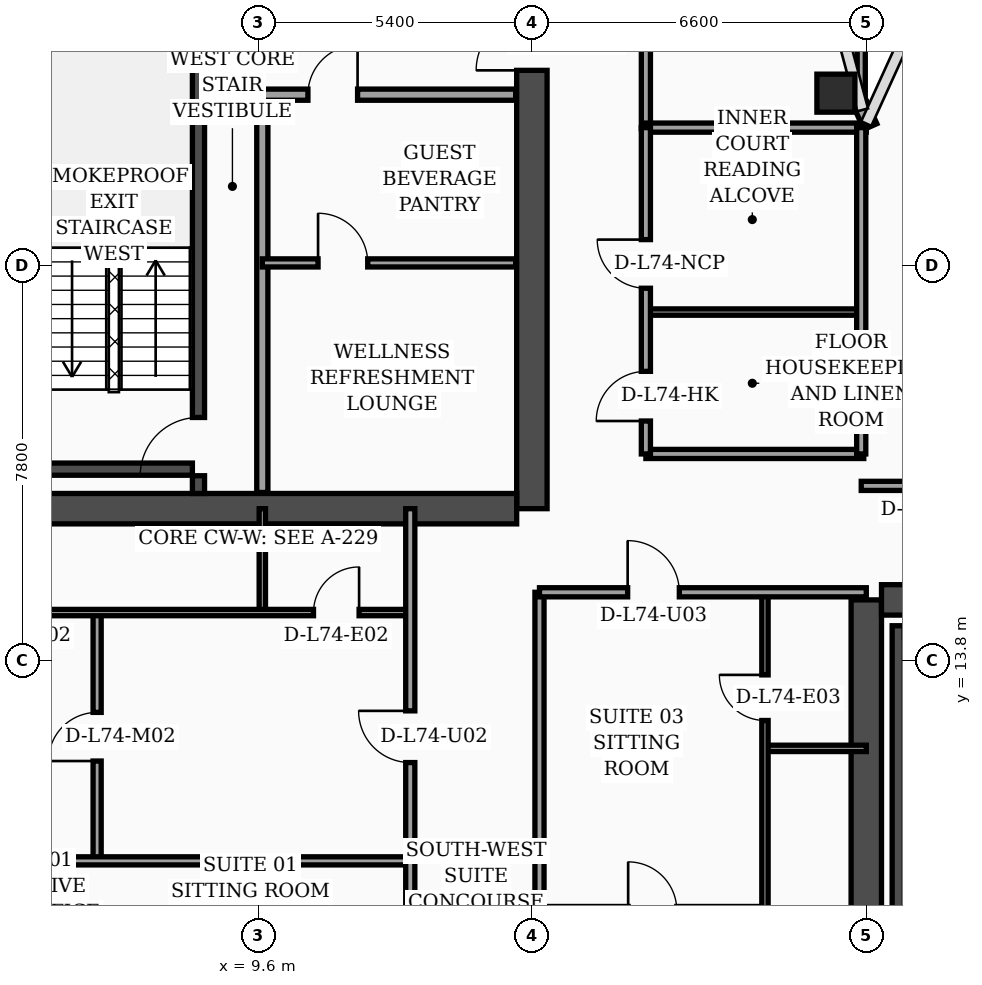
"""IFC4 building model, lengths in metres.
Left out: names, types, materials, properties, quantities, classifications, styles, units other than length and angle.
Written with IfcOpenShell. Run it as: python <this file> out.ifc"""

import sys

from ifc_helpers import new_model, si_unit, direction, frame, frame_2d, origin, origin_2d, place, context, subcontext, project, spatial, rectangle, hollow_rectangle, extrude, element, fill, save


model = new_model("IFC4")
c1 = context("Model", 3, precision=1e-05, world=origin(), true_north=direction((0.0, 1.0)))
c2 = subcontext(c1, "Body", "Model", "MODEL_VIEW")
j1 = project(units=[si_unit("LENGTHUNIT", "METRE"), si_unit("PLANEANGLEUNIT", "RADIAN")], contexts=[c1])
p1 = place(None, origin())
s1 = spatial("IfcSite", under=j1, at=p1, CompositionType="ELEMENT")
p2 = place(p1, origin())
s2 = spatial("IfcBuilding", under=s1, at=p2, CompositionType="ELEMENT")
p3 = place(p2, frame((0.0, 0.0, 298.7)))
s3 = spatial("IfcBuildingStorey", under=s2, at=p3, CompositionType="ELEMENT", Elevation=298.7)
p4 = place(p3, frame((15.0, 16.8, 0.0), z_axis=(0.0, 0.0, 1.0), x_axis=(0.0, 1.0, 0.0)))
e1 = element("IfcWall", 1, at=p4, inside=s3, PredefinedType="SHEAR", context=c2, shape_type="SweptSolid", body=[
    extrude(rectangle(XDim=21.6, YDim=0.6, at=frame_2d((10.8, 0.0))), origin(), (0.0, 0.0, 1.0), 3.56),
])
p5 = place(p4, frame((8.65, 0.0, 0.0)))
e2 = element("IfcOpeningElement", 2, at=p5, cuts=e1, PredefinedType="OPENING", context=c2, shape_type="SweptSolid", body=[
    extrude(rectangle(XDim=1.1, YDim=2.2, at=frame_2d((0.55, 1.1))), frame((0.0, 0.31, 0.0), z_axis=(0.0, -1.0, 0.0), x_axis=(1.0, 0.0, 0.0)), (0.0, 0.0, 1.0), 0.62),
])
p6 = place(p4, frame((18.9, 0.0, 0.0)))
e3 = element("IfcOpeningElement", 3, at=p6, cuts=e1, PredefinedType="OPENING", context=c2, shape_type="SweptSolid", body=[
    extrude(rectangle(XDim=1.1, YDim=2.2, at=frame_2d((0.55, 1.1))), frame((0.0, 0.31, 0.0), z_axis=(0.0, -1.0, 0.0), x_axis=(1.0, 0.0, 0.0)), (0.0, 0.0, 1.0), 0.62),
])
p7 = place(p3, frame((4.5, 16.8, 0.0), z_axis=(0.0, 0.0, 1.0), x_axis=(1.0, 0.0, 0.0)))
e4 = element("IfcWall", 4, at=p7, inside=s3, PredefinedType="SHEAR", context=c2, shape_type="SweptSolid", body=[
    extrude(rectangle(XDim=10.2, YDim=0.6, at=frame_2d((5.1, 0.0))), origin(), (0.0, 0.0, 1.0), 3.56),
])
p8 = place(p3, frame((21.6, 4.6, 0.0), z_axis=(0.0, 0.0, 1.0), x_axis=(0.0, 1.0, 0.0)))
e5 = element("IfcWall", 5, at=p8, inside=s3, PredefinedType="SHEAR", context=c2, shape_type="SweptSolid", body=[
    extrude(rectangle(XDim=10.4, YDim=0.6, at=frame_2d((5.2, 0.0))), origin(), (0.0, 0.0, 1.0), 3.56),
])
p9 = place(p3, frame((21.9, 15.0, 0.0), z_axis=(0.0, 0.0, 1.0), x_axis=(1.0, 0.0, 0.0)))
e6 = element("IfcWall", 6, at=p9, inside=s3, PredefinedType="SHEAR", context=c2, shape_type="SweptSolid", body=[
    extrude(rectangle(XDim=10.2, YDim=0.6, at=frame_2d((5.1, 0.0))), origin(), (0.0, 0.0, 1.0), 3.56),
])
p10 = place(p9, frame((5.0, 0.0, 0.0)))
e7 = element("IfcOpeningElement", 7, at=p10, cuts=e6, PredefinedType="OPENING", context=c2, shape_type="SweptSolid", body=[
    extrude(rectangle(XDim=1.1, YDim=2.2, at=frame_2d((0.55, 1.1))), frame((0.0, 0.31, 0.0), z_axis=(0.0, -1.0, 0.0), x_axis=(1.0, 0.0, 0.0)), (0.0, 0.0, 1.0), 0.62),
])
p11 = place(p3, frame((8.42, 17.1, 0.0), z_axis=(0.0, 0.0, 1.0), x_axis=(0.0, 1.0, 0.0)))
e8 = element("IfcWall", 8, at=p11, inside=s3, PredefinedType="SOLIDWALL", context=c2, shape_type="SweptSolid", body=[
    extrude(rectangle(XDim=9.69, YDim=0.24, at=frame_2d((4.845, 0.0))), origin(), (0.0, 0.0, 1.0), 3.56),
])
p12 = place(p11, frame((0.35, 0.0, 0.0)))
e9 = element("IfcOpeningElement", 9, at=p12, cuts=e8, PredefinedType="OPENING", context=c2, shape_type="SweptSolid", body=[
    extrude(rectangle(XDim=1.15, YDim=2.2, at=frame_2d((0.575, 1.1))), frame((0.0, 0.13, 0.0), z_axis=(0.0, -1.0, 0.0), x_axis=(1.0, 0.0, 0.0)), (0.0, 0.0, 1.0), 0.26),
])
p13 = place(p3, frame((5.2, 17.58, 0.0), z_axis=(0.0, 0.0, 1.0), x_axis=(1.0, 0.0, 0.0)))
e10 = element("IfcWall", 10, at=p13, inside=s3, PredefinedType="SOLIDWALL", context=c2, shape_type="SweptSolid", body=[
    extrude(rectangle(XDim=3.1, YDim=0.24, at=frame_2d((1.55, 0.0))), origin(), (0.0, 0.0, 1.0), 3.56),
])
p14 = place(p3, frame((22.23, 4.9, 0.0), z_axis=(0.0, 0.0, 1.0), x_axis=(0.0, 1.0, 0.0)))
e11 = element("IfcWall", 11, at=p14, inside=s3, PredefinedType="SOLIDWALL", context=c2, shape_type="SweptSolid", body=[
    extrude(rectangle(XDim=9.59, YDim=0.24, at=frame_2d((4.795, 0.0))), origin(), (0.0, 0.0, 1.0), 3.56),
])
p15 = place(p3, frame((21.0, 25.0, 0.0), z_axis=(0.0, 0.0, 1.0), x_axis=(1.0, 0.0, 0.0)))
e12 = element("IfcColumn", 12, at=p15, inside=s3, PredefinedType="COLUMN", context=c2, shape_type="SweptSolid", body=[
    extrude(hollow_rectangle(XDim=0.75, YDim=0.75, WallThickness=0.032, at=origin_2d()), origin(), (0.0, 0.0, 1.0), 3.56),
])
p16 = place(p3, frame((21.68, 24.34, 0.0), z_axis=(0.0, 0.0, 1.0), x_axis=(-0.40758134973, 0.913168901875, 0.0)))
e13 = element("IfcWall", 13, at=p16, inside=s3, PredefinedType="SOLIDWALL", context=c2, shape_type="SweptSolid", body=[
    extrude(rectangle(XDim=0.471, YDim=0.28, at=frame_2d((0.235, 0.0))), origin(), (0.0, 0.0, 1.0), 3.56),
])
p17 = place(p3, frame((9.68, 17.12, 0.0), z_axis=(0.0, 0.0, 1.0), x_axis=(0.0, 1.0, 0.0)))
e14 = element("IfcWall", 14, at=p17, inside=s3, PredefinedType="SOLIDWALL", context=c2, shape_type="SweptSolid", body=[
    extrude(rectangle(XDim=7.88, YDim=0.22, at=frame_2d((3.94, 0.0))), origin(), (0.0, 0.0, 1.0), 3.56),
])
p18 = place(p3, frame((9.68, 21.65, 0.0), z_axis=(0.0, 0.0, 1.0), x_axis=(1.0, 0.0, 0.0)))
e15 = element("IfcWall", 15, at=p18, inside=s3, PredefinedType="PARTITIONING", context=c2, shape_type="SweptSolid", body=[
    extrude(rectangle(XDim=5.0, YDim=0.16, at=frame_2d((2.5, 0.0))), origin(), (0.0, 0.0, 1.0), 3.09),
])
p19 = place(p18, frame((1.1, 0.0, 0.0)))
e16 = element("IfcOpeningElement", 16, at=p19, cuts=e15, PredefinedType="OPENING", context=c2, shape_type="SweptSolid", body=[
    extrude(rectangle(XDim=0.98, YDim=2.15, at=frame_2d((0.49, 1.075))), frame((0.0, 0.09, 0.0), z_axis=(0.0, -1.0, 0.0), x_axis=(1.0, 0.0, 0.0)), (0.0, 0.0, 1.0), 0.18),
])
p20 = place(p3, frame((9.68, 24.97, 0.0), z_axis=(0.0, 0.0, 1.0), x_axis=(1.0, 0.0, 0.0)))
e17 = element("IfcWall", 17, at=p20, inside=s3, PredefinedType="SOLIDWALL", context=c2, shape_type="SweptSolid", body=[
    extrude(rectangle(XDim=5.0, YDim=0.22, at=frame_2d((2.5, 0.0))), origin(), (0.0, 0.0, 1.0), 2.99),
])
p21 = place(p20, frame((0.9, 0.0, 0.0)))
e18 = element("IfcOpeningElement", 18, at=p21, cuts=e17, PredefinedType="OPENING", context=c2, shape_type="SweptSolid", body=[
    extrude(rectangle(XDim=0.98, YDim=2.15, at=frame_2d((0.49, 1.075))), frame((0.0, 0.12, 0.0), z_axis=(0.0, -1.0, 0.0), x_axis=(1.0, 0.0, 0.0)), (0.0, 0.0, 1.0), 0.24),
])
p22 = place(p3, frame((9.68, 7.92, 0.0), z_axis=(0.0, 0.0, 1.0), x_axis=(0.0, 1.0, 0.0)))
e19 = element("IfcWall", 19, at=p22, inside=s3, PredefinedType="PARTITIONING", context=c2, shape_type="SweptSolid", body=[
    extrude(rectangle(XDim=1.93, YDim=0.125, at=frame_2d((0.965, 0.0))), origin(), (0.0, 0.0, 1.0), 3.09),
])
p23 = place(p3, frame((9.68, 14.75, 0.0), z_axis=(0.0, 0.0, 1.0), x_axis=(0.0, 1.0, 0.0)))
e20 = element("IfcWall", 20, at=p23, inside=s3, PredefinedType="PARTITIONING", context=c2, shape_type="SweptSolid", body=[
    extrude(rectangle(XDim=2.05, YDim=0.125, at=frame_2d((1.025, 0.0))), origin(), (0.0, 0.0, 1.0), 3.56),
])
p24 = place(p3, frame((6.42, 9.85, 0.0), z_axis=(0.0, 0.0, 1.0), x_axis=(0.0, 1.0, 0.0)))
e21 = element("IfcWall", 21, at=p24, inside=s3, PredefinedType="PARTITIONING", context=c2, shape_type="SweptSolid", body=[
    extrude(rectangle(XDim=4.9, YDim=0.16, at=frame_2d((2.45, 0.0))), origin(), (0.0, 0.0, 1.0), 3.14),
])
p25 = place(p24, frame((1.97, 0.0, 0.0)))
e22 = element("IfcOpeningElement", 22, at=p25, cuts=e21, PredefinedType="OPENING", context=c2, shape_type="SweptSolid", body=[
    extrude(rectangle(XDim=0.96, YDim=2.2, at=frame_2d((0.48, 1.1))), frame((0.0, 0.09, 0.0), z_axis=(0.0, -1.0, 0.0), x_axis=(1.0, 0.0, 0.0)), (0.0, 0.0, 1.0), 0.18),
])
p26 = place(p3, frame((0.08, 14.75, 0.0), z_axis=(0.0, 0.0, 1.0), x_axis=(1.0, 0.0, 0.0)))
e23 = element("IfcWall", 23, at=p26, inside=s3, PredefinedType="PARTITIONING", context=c2, shape_type="SweptSolid", body=[
    extrude(rectangle(XDim=12.52, YDim=0.125, at=frame_2d((6.26, 0.0))), origin(), (0.0, 0.0, 1.0), 2.99),
])
p27 = place(p26, frame((4.32, 0.0, 0.0)))
e24 = element("IfcOpeningElement", 24, at=p27, cuts=e23, PredefinedType="OPENING", context=c2, shape_type="SweptSolid", body=[
    extrude(rectangle(XDim=0.96, YDim=2.2, at=frame_2d((0.48, 1.1))), frame((0.0, 0.073, 0.0), z_axis=(0.0, -1.0, 0.0), x_axis=(1.0, 0.0, 0.0)), (0.0, 0.0, 1.0), 0.145),
])
p28 = place(p26, frame((10.61, 0.0, 0.0)))
e25 = element("IfcOpeningElement", 25, at=p28, cuts=e23, PredefinedType="OPENING", context=c2, shape_type="SweptSolid", body=[
    extrude(rectangle(XDim=0.9, YDim=2.15, at=frame_2d((0.45, 1.075))), frame((0.0, 0.073, 0.0), z_axis=(0.0, -1.0, 0.0), x_axis=(1.0, 0.0, 0.0)), (0.0, 0.0, 1.0), 0.145),
])
p29 = place(p3, frame((0.08, 9.85, 0.0), z_axis=(0.0, 0.0, 1.0), x_axis=(1.0, 0.0, 0.0)))
e26 = element("IfcWall", 26, at=p29, inside=s3, PredefinedType="PARTITIONING", context=c2, shape_type="SweptSolid", body=[
    extrude(rectangle(XDim=12.52, YDim=0.16, at=frame_2d((6.26, 0.0))), origin(), (0.0, 0.0, 1.0), 2.99),
])
p30 = place(p3, frame((12.6, 2.44, 0.0), z_axis=(0.0, 0.0, 1.0), x_axis=(0.0, 1.0, 0.0)))
e27 = element("IfcWall", 27, at=p30, inside=s3, PredefinedType="PARTITIONING", context=c2, shape_type="SweptSolid", body=[
    extrude(rectangle(XDim=14.36, YDim=0.18, at=frame_2d((7.18, 0.0))), origin(), (0.0, 0.0, 1.0), 2.99),
])
p31 = place(p30, frame((3.01, 0.0, 0.0)))
e28 = element("IfcOpeningElement", 28, at=p31, cuts=e27, PredefinedType="OPENING", context=c2, shape_type="SweptSolid", body=[
    extrude(rectangle(XDim=1.02, YDim=2.2, at=frame_2d((0.51, 1.1))), frame((0.0, 0.1, 0.0), z_axis=(0.0, -1.0, 0.0), x_axis=(1.0, 0.0, 0.0)), (0.0, 0.0, 1.0), 0.2),
])
p32 = place(p30, frame((9.35, 0.0, 0.0)))
e29 = element("IfcOpeningElement", 29, at=p32, cuts=e27, PredefinedType="OPENING", context=c2, shape_type="SweptSolid", body=[
    extrude(rectangle(XDim=1.02, YDim=2.2, at=frame_2d((0.51, 1.1))), frame((0.0, 0.1, 0.0), z_axis=(0.0, -1.0, 0.0), x_axis=(1.0, 0.0, 0.0)), (0.0, 0.0, 1.0), 0.2),
])
p33 = place(p3, frame((15.15, 2.44, 0.0), z_axis=(0.0, 0.0, 1.0), x_axis=(0.0, 1.0, 0.0)))
e30 = element("IfcWall", 30, at=p33, inside=s3, PredefinedType="PARTITIONING", context=c2, shape_type="SweptSolid", body=[
    extrude(rectangle(XDim=12.71, YDim=0.18, at=frame_2d((6.355, 0.0))), origin(), (0.0, 0.0, 1.0), 3.09),
])
p34 = place(p3, frame((19.6, 12.07, 0.0), z_axis=(0.0, 0.0, 1.0), x_axis=(1.0, 0.0, 0.0)))
e31 = element("IfcWall", 31, at=p34, inside=s3, PredefinedType="PARTITIONING", context=c2, shape_type="SweptSolid", body=[
    extrude(rectangle(XDim=2.0, YDim=0.125, at=frame_2d((1.0, 0.0))), origin(), (0.0, 0.0, 1.0), 3.56),
])
p35 = place(p3, frame((19.6, 2.44, 0.0), z_axis=(0.0, 0.0, 1.0), x_axis=(0.0, 1.0, 0.0)))
e32 = element("IfcWall", 32, at=p35, inside=s3, PredefinedType="PARTITIONING", context=c2, shape_type="SweptSolid", body=[
    extrude(rectangle(XDim=12.71, YDim=0.125, at=frame_2d((6.355, 0.0))), origin(), (0.0, 0.0, 1.0), 2.59),
])
p36 = place(p35, frame((4.34, 0.0, 0.0)))
e33 = element("IfcOpeningElement", 33, at=p36, cuts=e32, PredefinedType="OPENING", context=c2, shape_type="SweptSolid", body=[
    extrude(rectangle(XDim=0.96, YDim=2.2, at=frame_2d((0.48, 1.1))), frame((0.0, 0.073, 0.0), z_axis=(0.0, -1.0, 0.0), x_axis=(1.0, 0.0, 0.0)), (0.0, 0.0, 1.0), 0.145),
])
p37 = place(p35, frame((10.18, 0.0, 0.0)))
e34 = element("IfcOpeningElement", 34, at=p37, cuts=e32, PredefinedType="OPENING", context=c2, shape_type="SweptSolid", body=[
    extrude(rectangle(XDim=0.9, YDim=2.15, at=frame_2d((0.45, 1.075))), frame((0.0, 0.073, 0.0), z_axis=(0.0, -1.0, 0.0), x_axis=(1.0, 0.0, 0.0)), (0.0, 0.0, 1.0), 0.145),
])
p38 = place(p3, frame((15.15, 15.15, 0.0), z_axis=(0.0, 0.0, 1.0), x_axis=(1.0, 0.0, 0.0)))
e35 = element("IfcWall", 35, at=p38, inside=s3, PredefinedType="PARTITIONING", context=c2, shape_type="SweptSolid", body=[
    extrude(rectangle(XDim=6.45, YDim=0.18, at=frame_2d((3.225, 0.0))), origin(), (0.0, 0.0, 1.0), 2.59),
])
p39 = place(p38, frame((1.74, 0.0, 0.0)))
e36 = element("IfcOpeningElement", 36, at=p39, cuts=e35, PredefinedType="OPENING", context=c2, shape_type="SweptSolid", body=[
    extrude(rectangle(XDim=1.02, YDim=2.2, at=frame_2d((0.51, 1.1))), frame((0.0, 0.1, 0.0), z_axis=(0.0, -1.0, 0.0), x_axis=(1.0, 0.0, 0.0)), (0.0, 0.0, 1.0), 0.2),
])
p40 = place(p3, frame((17.25, 24.3, 0.0), z_axis=(0.0, 0.0, 1.0), x_axis=(0.0, 1.0, 0.0)))
e37 = element("IfcWall", 37, at=p40, inside=s3, PredefinedType="PARTITIONING", context=c2, shape_type="SweptSolid", body=[
    extrude(rectangle(XDim=18.15, YDim=0.18, at=frame_2d((9.075, 0.0))), origin(), (0.0, 0.0, 1.0), 2.99),
])
p41 = place(p40, frame((3.2, 0.0, 0.0)))
e38 = element("IfcOpeningElement", 38, at=p41, cuts=e37, PredefinedType="OPENING", context=c2, shape_type="SweptSolid", body=[
    extrude(rectangle(XDim=1.02, YDim=2.2, at=frame_2d((0.51, 1.1))), frame((0.0, 0.1, 0.0), z_axis=(0.0, -1.0, 0.0), x_axis=(1.0, 0.0, 0.0)), (0.0, 0.0, 1.0), 0.2),
])
p42 = place(p3, frame((17.25, 17.88, 0.0), z_axis=(0.0, 0.0, 1.0), x_axis=(1.0, 0.0, 0.0)))
e39 = element("IfcWall", 39, at=p42, inside=s3, PredefinedType="PARTITIONING", context=c2, shape_type="SweptSolid", body=[
    extrude(rectangle(XDim=4.3, YDim=0.18, at=frame_2d((2.15, 0.0))), origin(), (0.0, 0.0, 1.0), 3.56),
])
p43 = place(p3, frame((17.25, 20.68, 0.0), z_axis=(0.0, 0.0, 1.0), x_axis=(1.0, 0.0, 0.0)))
e40 = element("IfcWall", 40, at=p43, inside=s3, PredefinedType="PARTITIONING", context=c2, shape_type="SweptSolid", body=[
    extrude(rectangle(XDim=4.3, YDim=0.125, at=frame_2d((2.15, 0.0))), origin(), (0.0, 0.0, 1.0), 3.56),
])
p44 = place(p3, frame((17.25, 24.32, 0.0), z_axis=(0.0, 0.0, 1.0), x_axis=(1.0, 0.0, 0.0)))
e41 = element("IfcWall", 41, at=p44, inside=s3, PredefinedType="PARTITIONING", context=c2, shape_type="SweptSolid", body=[
    extrude(rectangle(XDim=4.35, YDim=0.18, at=frame_2d((2.175, 0.0))), origin(), (0.0, 0.0, 1.0), 3.56),
])
p45 = place(p3, frame((21.5, 17.88, 0.0), z_axis=(0.0, 0.0, 1.0), x_axis=(0.0, 1.0, 0.0)))
e42 = element("IfcWall", 42, at=p45, inside=s3, PredefinedType="PARTITIONING", context=c2, shape_type="SweptSolid", body=[
    extrude(rectangle(XDim=6.44, YDim=0.18, at=frame_2d((3.22, 0.0))), origin(), (0.0, 0.0, 1.0), 3.09),
])
p46 = place(p3, frame((17.25, 17.88, 0.0), z_axis=(0.0, 0.0, 1.0), x_axis=(0.0, 1.0, 0.0)))
e43 = element("IfcWall", 43, at=p46, inside=s3, PredefinedType="PARTITIONING", context=c2, shape_type="SweptSolid", body=[
    extrude(rectangle(XDim=6.44, YDim=0.18, at=frame_2d((3.22, 0.0))), origin(), (0.0, 0.0, 1.0), 3.09),
])
p47 = place(p46, frame((0.65, 0.0, 0.0)))
e44 = element("IfcOpeningElement", 44, at=p47, cuts=e43, PredefinedType="OPENING", context=c2, shape_type="SweptSolid", body=[
    extrude(rectangle(XDim=0.98, YDim=2.15, at=frame_2d((0.49, 1.075))), frame((0.0, 0.1, 0.0), z_axis=(0.0, -1.0, 0.0), x_axis=(1.0, 0.0, 0.0)), (0.0, 0.0, 1.0), 0.2),
])
p48 = place(p46, frame((3.27, 0.0, 0.0)))
e45 = element("IfcOpeningElement", 45, at=p48, cuts=e43, PredefinedType="OPENING", context=c2, shape_type="SweptSolid", body=[
    extrude(rectangle(XDim=0.96, YDim=2.2, at=frame_2d((0.48, 1.1))), frame((0.0, 0.1, 0.0), z_axis=(0.0, -1.0, 0.0), x_axis=(1.0, 0.0, 0.0)), (0.0, 0.0, 1.0), 0.2),
])
p49 = place(p3, frame((21.5, 24.85, 0.0), z_axis=(0.0, 0.0, 1.0), x_axis=(0.0, 1.0, 0.0)))
e46 = element("IfcWall", 46, at=p49, inside=s3, PredefinedType="PARTITIONING", context=c2, shape_type="SweptSolid", body=[
    extrude(rectangle(XDim=13.05, YDim=0.16, at=frame_2d((6.525, 0.0))), origin(), (0.0, 0.0, 1.0), 2.99),
])
p50 = place(p3, frame((21.5, 17.25, 0.0), z_axis=(0.0, 0.0, 1.0), x_axis=(1.0, 0.0, 0.0)))
e47 = element("IfcWall", 47, at=p50, inside=s3, PredefinedType="PARTITIONING", context=c2, shape_type="SweptSolid", body=[
    extrude(rectangle(XDim=4.75, YDim=0.18, at=frame_2d((2.375, 0.0))), origin(), (0.0, 0.0, 1.0), 3.56),
])
p51 = place(p50, frame((0.95, 0.0, 0.0)))
e48 = element("IfcOpeningElement", 48, at=p51, cuts=e47, PredefinedType="OPENING", context=c2, shape_type="SweptSolid", body=[
    extrude(rectangle(XDim=1.02, YDim=2.2, at=frame_2d((0.51, 1.1))), frame((0.0, 0.1, 0.0), z_axis=(0.0, -1.0, 0.0), x_axis=(1.0, 0.0, 0.0)), (0.0, 0.0, 1.0), 0.2),
])
p52 = place(p19, origin())
e49 = element("IfcDoor", 49, at=p52, inside=s3, OperationType="SINGLE_SWING_LEFT", PredefinedType="DOOR", context=c2, shape_type="SweptSolid", body=[
    extrude(rectangle(XDim=0.98, YDim=2.15, at=frame_2d((0.49, 1.075))), frame((0.0, 0.025, 0.0), z_axis=(0.0, -1.0, 0.0), x_axis=(1.0, 0.0, 0.0)), (0.0, 0.0, 1.0), 0.05),
])
fill(e16, e49)
p53 = place(p21, origin())
e50 = element("IfcDoor", 50, at=p53, inside=s3, OperationType="SINGLE_SWING_RIGHT", PredefinedType="DOOR", context=c2, shape_type="SweptSolid", body=[
    extrude(rectangle(XDim=0.98, YDim=2.15, at=frame_2d((0.49, 1.075))), frame((0.0, 0.025, 0.0), z_axis=(0.0, -1.0, 0.0), x_axis=(1.0, 0.0, 0.0)), (0.0, 0.0, 1.0), 0.05),
])
fill(e18, e50)
p54 = place(p25, origin())
e51 = element("IfcDoor", 51, at=p54, inside=s3, OperationType="SINGLE_SWING_LEFT", PredefinedType="DOOR", context=c2, shape_type="SweptSolid", body=[
    extrude(rectangle(XDim=0.96, YDim=2.2, at=frame_2d((0.48, 1.1))), frame((0.0, 0.025, 0.0), z_axis=(0.0, -1.0, 0.0), x_axis=(1.0, 0.0, 0.0)), (0.0, 0.0, 1.0), 0.05),
])
fill(e22, e51)
p55 = place(p28, origin())
e52 = element("IfcDoor", 52, at=p55, inside=s3, OperationType="SINGLE_SWING_RIGHT", PredefinedType="DOOR", context=c2, shape_type="SweptSolid", body=[
    extrude(rectangle(XDim=0.9, YDim=2.15, at=frame_2d((0.45, 1.075))), frame((0.0, 0.025, 0.0), z_axis=(0.0, -1.0, 0.0), x_axis=(1.0, 0.0, 0.0)), (0.0, 0.0, 1.0), 0.05),
])
fill(e25, e52)
p56 = place(p32, origin())
e53 = element("IfcDoor", 53, at=p56, inside=s3, OperationType="SINGLE_SWING_RIGHT", PredefinedType="DOOR", context=c2, shape_type="SweptSolid", body=[
    extrude(rectangle(XDim=1.02, YDim=2.2, at=frame_2d((0.51, 1.1))), frame((0.0, 0.025, 0.0), z_axis=(0.0, -1.0, 0.0), x_axis=(1.0, 0.0, 0.0)), (0.0, 0.0, 1.0), 0.05),
])
fill(e29, e53)
p57 = place(p37, origin())
e54 = element("IfcDoor", 54, at=p57, inside=s3, OperationType="SINGLE_SWING_RIGHT", PredefinedType="DOOR", context=c2, shape_type="SweptSolid", body=[
    extrude(rectangle(XDim=0.9, YDim=2.15, at=frame_2d((0.45, 1.075))), frame((0.0, 0.025, 0.0), z_axis=(0.0, -1.0, 0.0), x_axis=(1.0, 0.0, 0.0)), (0.0, 0.0, 1.0), 0.05),
])
fill(e34, e54)
p58 = place(p39, origin())
e55 = element("IfcDoor", 55, at=p58, inside=s3, OperationType="SINGLE_SWING_LEFT", PredefinedType="DOOR", context=c2, shape_type="SweptSolid", body=[
    extrude(rectangle(XDim=1.02, YDim=2.2, at=frame_2d((0.51, 1.1))), frame((0.0, 0.025, 0.0), z_axis=(0.0, -1.0, 0.0), x_axis=(1.0, 0.0, 0.0)), (0.0, 0.0, 1.0), 0.05),
])
fill(e36, e55)
p59 = place(p47, origin())
e56 = element("IfcDoor", 56, at=p59, inside=s3, OperationType="SINGLE_SWING_LEFT", PredefinedType="DOOR", context=c2, shape_type="SweptSolid", body=[
    extrude(rectangle(XDim=0.98, YDim=2.15, at=frame_2d((0.49, 1.075))), frame((0.0, 0.025, 0.0), z_axis=(0.0, -1.0, 0.0), x_axis=(1.0, 0.0, 0.0)), (0.0, 0.0, 1.0), 0.05),
])
fill(e44, e56)
p60 = place(p48, origin())
e57 = element("IfcDoor", 57, at=p60, inside=s3, OperationType="SINGLE_SWING_RIGHT", PredefinedType="DOOR", context=c2, shape_type="SweptSolid", body=[
    extrude(rectangle(XDim=0.96, YDim=2.2, at=frame_2d((0.48, 1.1))), frame((0.0, 0.025, 0.0), z_axis=(0.0, -1.0, 0.0), x_axis=(1.0, 0.0, 0.0)), (0.0, 0.0, 1.0), 0.05),
])
fill(e45, e57)
p61 = place(p12, origin())
e58 = element("IfcDoor", 58, at=p61, inside=s3, OperationType="SINGLE_SWING_LEFT", PredefinedType="DOOR", context=c2, shape_type="SweptSolid", body=[
    extrude(rectangle(XDim=1.15, YDim=2.2, at=frame_2d((0.575, 1.1))), frame((0.0, 0.025, 0.0), z_axis=(0.0, -1.0, 0.0), x_axis=(1.0, 0.0, 0.0)), (0.0, 0.0, 1.0), 0.05),
])
fill(e9, e58)
p62 = place(p5, origin())
e59 = element("IfcDoor", 59, at=p62, inside=s3, OperationType="SINGLE_SWING_LEFT", PredefinedType="DOOR", context=c2, shape_type="SweptSolid", body=[
    extrude(rectangle(XDim=1.1, YDim=2.2, at=frame_2d((0.55, 1.1))), frame((0.0, 0.025, 0.0), z_axis=(0.0, -1.0, 0.0), x_axis=(1.0, 0.0, 0.0)), (0.0, 0.0, 1.0), 0.05),
])
fill(e2, e59)
save(model, sys.argv[1])
